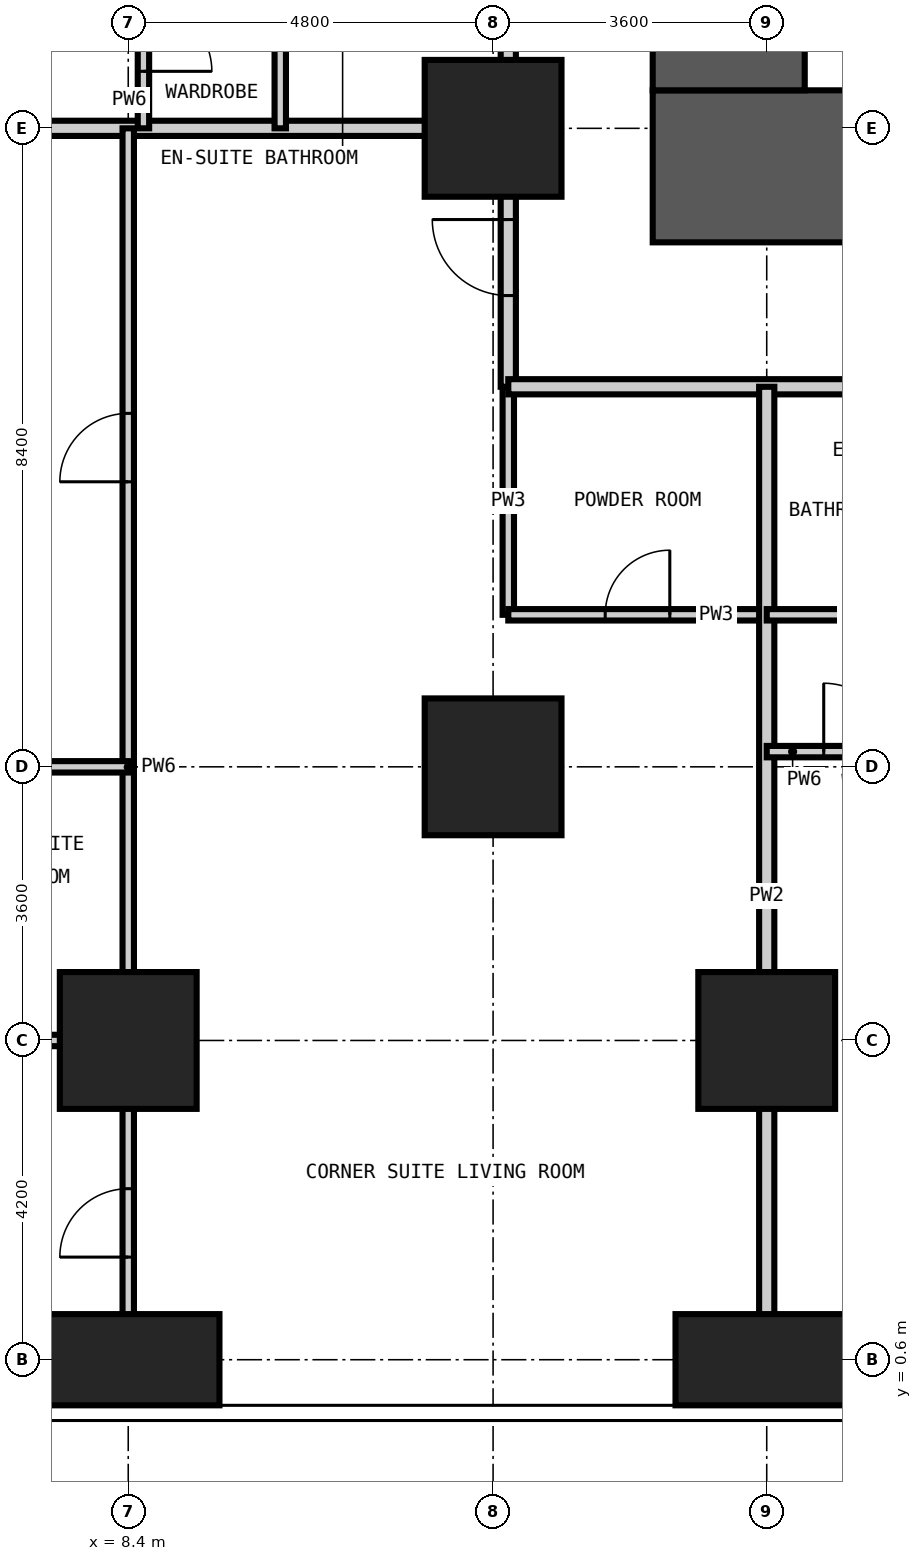
"""IFC4 building model, lengths in metres.
Left out: names, types, materials, properties, quantities, classifications, styles, units other than length and angle.
Written with IfcOpenShell. Run it as: python <this file> out.ifc"""

import sys

from ifc_helpers import new_model, si_unit, direction, frame, frame_2d, origin, origin_2d, place, context, subcontext, project, spatial, rectangle, extrude, element, fill, save


model = new_model("IFC4")
c1 = context("Model", 3, precision=1e-05, world=origin(), true_north=direction((0.0, 1.0)))
c2 = subcontext(c1, "Body", "Model", "MODEL_VIEW")
j1 = project(units=[si_unit("LENGTHUNIT", "METRE"), si_unit("PLANEANGLEUNIT", "RADIAN")], contexts=[c1])
p1 = place(None, origin())
s1 = spatial("IfcSite", under=j1, at=p1, CompositionType="ELEMENT")
p2 = place(p1, origin())
s2 = spatial("IfcBuilding", under=s1, at=p2, CompositionType="ELEMENT")
p3 = place(p2, frame((0.0, 0.0, 27.0)))
s3 = spatial("IfcBuildingStorey", under=s2, at=p3, CompositionType="ELEMENT", Elevation=27.0)
p4 = place(p3, frame((8.4, 0.6, -0.35), z_axis=(0.0, 0.0, 1.0), x_axis=(1.0, 0.0, 0.0)))
e1 = element("IfcColumn", 1, at=p4, inside=s3, PredefinedType="COLUMN", context=c2, shape_type="SweptSolid", body=[
    extrude(rectangle(XDim=2.4, YDim=1.2, at=origin_2d()), origin(), (0.0, 0.0, 1.0), 3.6),
])
for number, where, z_axis, x_axis in (
    (2, (8.4, 4.8, -0.35), (0.0, 0.0, 1.0), (1.0, 0.0, 0.0)),
    (3, (13.2, 8.4, -0.35), (0.0, 0.0, 1.0), (1.0, 0.0, 0.0)),
    (4, (13.2, 16.8, -0.35), (0.0, 0.0, 1.0), (1.0, 0.0, 0.0)),
):
    element("IfcColumn", number, at=place(p3, frame(where, z_axis=z_axis, x_axis=x_axis)), inside=s3, PredefinedType="COLUMN", context=c2, shape_type="SweptSolid", body=[
        extrude(rectangle(XDim=1.8, YDim=1.8, at=origin_2d()), origin(), (0.0, 0.0, 1.0), 3.6),
    ])
p5 = place(p3, frame((16.8, 0.6, -0.35), z_axis=(0.0, 0.0, 1.0), x_axis=(1.0, 0.0, 0.0)))
e5 = element("IfcColumn", 5, at=p5, inside=s3, PredefinedType="COLUMN", context=c2, shape_type="SweptSolid", body=[
    extrude(rectangle(XDim=2.4, YDim=1.2, at=origin_2d()), origin(), (0.0, 0.0, 1.0), 3.6),
])
p6 = place(p3, frame((16.8, 4.8, -0.35), z_axis=(0.0, 0.0, 1.0), x_axis=(1.0, 0.0, 0.0)))
e6 = element("IfcColumn", 6, at=p6, inside=s3, PredefinedType="COLUMN", context=c2, shape_type="SweptSolid", body=[
    extrude(rectangle(XDim=1.8, YDim=1.8, at=origin_2d()), origin(), (0.0, 0.0, 1.0), 3.6),
])
p7 = place(p3, frame((15.3, 16.3, -0.35), z_axis=(0.0, 0.0, 1.0), x_axis=(1.0, 0.0, 0.0)))
e7 = element("IfcWall", 7, at=p7, inside=s3, PredefinedType="SHEAR", context=c2, shape_type="SweptSolid", body=[
    extrude(rectangle(XDim=28.2, YDim=2.0, at=frame_2d((14.1, 0.0))), origin(), (0.0, 0.0, 1.0), 3.6),
])
p8 = place(p7, frame((13.6, 0.0, 0.35)))
e8 = element("IfcOpeningElement", 8, at=p8, cuts=e7, PredefinedType="OPENING", context=c2, shape_type="SweptSolid", body=[
    extrude(rectangle(XDim=1.0, YDim=2.1, at=frame_2d((0.5, 1.05))), frame((0.0, 1.01, 0.0), z_axis=(0.0, -1.0, 0.0), x_axis=(1.0, 0.0, 0.0)), (0.0, 0.0, 1.0), 2.02),
])
p9 = place(p7, frame((19.9, 0.0, 0.35)))
e9 = element("IfcOpeningElement", 9, at=p9, cuts=e7, PredefinedType="OPENING", context=c2, shape_type="SweptSolid", body=[
    extrude(rectangle(XDim=1.0, YDim=2.1, at=frame_2d((0.5, 1.05))), frame((0.0, 1.01, 0.0), z_axis=(0.0, -1.0, 0.0), x_axis=(1.0, 0.0, 0.0)), (0.0, 0.0, 1.0), 2.02),
])
p10 = place(p3, frame((16.3, 41.5, -0.35), z_axis=(0.0, 0.0, 1.0), x_axis=(0.0, -1.0, 0.0)))
e10 = element("IfcWall", 10, at=p10, inside=s3, PredefinedType="SHEAR", context=c2, shape_type="SweptSolid", body=[
    extrude(rectangle(XDim=24.2, YDim=2.0, at=frame_2d((12.1, 0.0))), origin(), (0.0, 0.0, 1.0), 3.6),
])
p11 = place(p10, frame((11.2, 0.0, 0.35)))
e11 = element("IfcOpeningElement", 11, at=p11, cuts=e10, PredefinedType="OPENING", context=c2, shape_type="SweptSolid", body=[
    extrude(rectangle(XDim=1.8, YDim=2.2, at=frame_2d((0.9, 1.1))), frame((0.0, 1.01, 0.0), z_axis=(0.0, -1.0, 0.0), x_axis=(1.0, 0.0, 0.0)), (0.0, 0.0, 1.0), 2.02),
])
p12 = place(p10, frame((20.0, 0.0, 0.35)))
e12 = element("IfcOpeningElement", 12, at=p12, cuts=e10, PredefinedType="OPENING", context=c2, shape_type="SweptSolid", body=[
    extrude(rectangle(XDim=1.0, YDim=2.1, at=frame_2d((0.5, 1.05))), frame((0.0, 1.01, 0.0), z_axis=(0.0, -1.0, 0.0), x_axis=(1.0, 0.0, 0.0)), (0.0, 0.0, 1.0), 2.02),
])
p13 = place(p10, frame((5.3, 0.0, 0.35)))
e13 = element("IfcOpeningElement", 13, at=p13, cuts=e10, PredefinedType="OPENING", context=c2, shape_type="SweptSolid", body=[
    extrude(rectangle(XDim=1.0, YDim=2.1, at=frame_2d((0.5, 1.05))), frame((0.0, 1.01, 0.0), z_axis=(0.0, -1.0, 0.0), x_axis=(1.0, 0.0, 0.0)), (0.0, 0.0, 1.0), 2.02),
])
for number, where, z_axis, x_axis in (
    (14, (13.4, 10.4, 0.0), (0.0, 0.0, 1.0), (0.0, 1.0, 0.0)),
    (15, (5.4, 4.8, 0.0), (0.0, 0.0, 1.0), (1.0, 0.0, 0.0)),
):
    element("IfcWall", number, at=place(p3, frame(where, z_axis=z_axis, x_axis=x_axis)), inside=s3, PredefinedType="PARTITIONING", context=c2, shape_type="SweptSolid", body=[
        extrude(rectangle(XDim=3.0, YDim=0.15, at=frame_2d((1.5, 0.0))), origin(), (0.0, 0.0, 1.0), 3.25),
    ])
p14 = place(p3, frame((13.4, 10.4, 0.0), z_axis=(0.0, 0.0, 1.0), x_axis=(1.0, 0.0, 0.0)))
e16 = element("IfcWall", 16, at=p14, inside=s3, PredefinedType="PARTITIONING", context=c2, shape_type="SweptSolid", body=[
    extrude(rectangle(XDim=3.4, YDim=0.15, at=frame_2d((1.7, 0.0))), origin(), (0.0, 0.0, 1.0), 3.25),
])
p15 = place(p14, frame((1.275, 0.0, 0.0)))
e17 = element("IfcOpeningElement", 17, at=p15, cuts=e16, PredefinedType="OPENING", context=c2, shape_type="SweptSolid", body=[
    extrude(rectangle(XDim=0.85, YDim=2.1, at=frame_2d((0.425, 1.05))), frame((0.0, 0.085, 0.0), z_axis=(0.0, -1.0, 0.0), x_axis=(1.0, 0.0, 0.0)), (0.0, 0.0, 1.0), 0.17),
])
p16 = place(p3, frame((13.4, 13.4, 0.0), z_axis=(0.0, 0.0, 1.0), x_axis=(0.0, 1.0, 0.0)))
e18 = element("IfcWall", 18, at=p16, inside=s3, PredefinedType="PARTITIONING", context=c2, shape_type="SweptSolid", body=[
    extrude(rectangle(XDim=20.2, YDim=0.2, at=frame_2d((10.1, 0.0))), origin(), (0.0, 0.0, 1.0), 3.25),
])
p17 = place(p16, frame((6.2, 0.0, 0.0)))
e19 = element("IfcOpeningElement", 19, at=p17, cuts=e18, PredefinedType="OPENING", context=c2, shape_type="SweptSolid", body=[
    extrude(rectangle(XDim=1.0, YDim=2.2, at=frame_2d((0.5, 1.1))), frame((0.0, 0.11, 0.0), z_axis=(0.0, -1.0, 0.0), x_axis=(1.0, 0.0, 0.0)), (0.0, 0.0, 1.0), 0.22),
])
p18 = place(p16, frame((8.0, 0.0, 0.0)))
e20 = element("IfcOpeningElement", 20, at=p18, cuts=e18, PredefinedType="OPENING", context=c2, shape_type="SweptSolid", body=[
    extrude(rectangle(XDim=1.0, YDim=2.2, at=frame_2d((0.5, 1.1))), frame((0.0, 0.11, 0.0), z_axis=(0.0, -1.0, 0.0), x_axis=(1.0, 0.0, 0.0)), (0.0, 0.0, 1.0), 0.22),
])
p19 = place(p16, frame((14.6, 0.0, 0.0)))
e21 = element("IfcOpeningElement", 21, at=p19, cuts=e18, PredefinedType="OPENING", context=c2, shape_type="SweptSolid", body=[
    extrude(rectangle(XDim=1.0, YDim=2.2, at=frame_2d((0.5, 1.1))), frame((0.0, 0.11, 0.0), z_axis=(0.0, -1.0, 0.0), x_axis=(1.0, 0.0, 0.0)), (0.0, 0.0, 1.0), 0.22),
])
p20 = place(p16, frame((16.4, 0.0, 0.0)))
e22 = element("IfcOpeningElement", 22, at=p20, cuts=e18, PredefinedType="OPENING", context=c2, shape_type="SweptSolid", body=[
    extrude(rectangle(XDim=1.0, YDim=2.2, at=frame_2d((0.5, 1.1))), frame((0.0, 0.11, 0.0), z_axis=(0.0, -1.0, 0.0), x_axis=(1.0, 0.0, 0.0)), (0.0, 0.0, 1.0), 0.22),
])
p21 = place(p16, frame((1.2, 0.0, 0.0)))
e23 = element("IfcOpeningElement", 23, at=p21, cuts=e18, PredefinedType="OPENING", context=c2, shape_type="SweptSolid", body=[
    extrude(rectangle(XDim=1.0, YDim=2.2, at=frame_2d((0.5, 1.1))), frame((0.0, 0.11, 0.0), z_axis=(0.0, -1.0, 0.0), x_axis=(1.0, 0.0, 0.0)), (0.0, 0.0, 1.0), 0.22),
])
p22 = place(p3, frame((45.7, 13.4, 0.0), z_axis=(0.0, 0.0, 1.0), x_axis=(-1.0, 0.0, 0.0)))
e24 = element("IfcWall", 24, at=p22, inside=s3, PredefinedType="PARTITIONING", context=c2, shape_type="SweptSolid", body=[
    extrude(rectangle(XDim=32.3, YDim=0.2, at=frame_2d((16.15, 0.0))), origin(), (0.0, 0.0, 1.0), 3.25),
])
p23 = place(p22, frame((25.1, 0.0, 0.0)))
e25 = element("IfcOpeningElement", 25, at=p23, cuts=e24, PredefinedType="OPENING", context=c2, shape_type="SweptSolid", body=[
    extrude(rectangle(XDim=1.0, YDim=2.2, at=frame_2d((0.5, 1.1))), frame((0.0, 0.11, 0.0), z_axis=(0.0, -1.0, 0.0), x_axis=(1.0, 0.0, 0.0)), (0.0, 0.0, 1.0), 0.22),
])
p24 = place(p22, frame((23.3, 0.0, 0.0)))
e26 = element("IfcOpeningElement", 26, at=p24, cuts=e24, PredefinedType="OPENING", context=c2, shape_type="SweptSolid", body=[
    extrude(rectangle(XDim=1.0, YDim=2.2, at=frame_2d((0.5, 1.1))), frame((0.0, 0.11, 0.0), z_axis=(0.0, -1.0, 0.0), x_axis=(1.0, 0.0, 0.0)), (0.0, 0.0, 1.0), 0.22),
])
p25 = place(p22, frame((16.7, 0.0, 0.0)))
e27 = element("IfcOpeningElement", 27, at=p25, cuts=e24, PredefinedType="OPENING", context=c2, shape_type="SweptSolid", body=[
    extrude(rectangle(XDim=1.0, YDim=2.2, at=frame_2d((0.5, 1.1))), frame((0.0, 0.11, 0.0), z_axis=(0.0, -1.0, 0.0), x_axis=(1.0, 0.0, 0.0)), (0.0, 0.0, 1.0), 0.22),
])
p26 = place(p22, frame((14.9, 0.0, 0.0)))
e28 = element("IfcOpeningElement", 28, at=p26, cuts=e24, PredefinedType="OPENING", context=c2, shape_type="SweptSolid", body=[
    extrude(rectangle(XDim=1.0, YDim=2.2, at=frame_2d((0.5, 1.1))), frame((0.0, 0.11, 0.0), z_axis=(0.0, -1.0, 0.0), x_axis=(1.0, 0.0, 0.0)), (0.0, 0.0, 1.0), 0.22),
])
p27 = place(p22, frame((8.3, 0.0, 0.0)))
e29 = element("IfcOpeningElement", 29, at=p27, cuts=e24, PredefinedType="OPENING", context=c2, shape_type="SweptSolid", body=[
    extrude(rectangle(XDim=1.0, YDim=2.2, at=frame_2d((0.5, 1.1))), frame((0.0, 0.11, 0.0), z_axis=(0.0, -1.0, 0.0), x_axis=(1.0, 0.0, 0.0)), (0.0, 0.0, 1.0), 0.22),
])
p28 = place(p22, frame((6.5, 0.0, 0.0)))
e30 = element("IfcOpeningElement", 30, at=p28, cuts=e24, PredefinedType="OPENING", context=c2, shape_type="SweptSolid", body=[
    extrude(rectangle(XDim=1.0, YDim=2.2, at=frame_2d((0.5, 1.1))), frame((0.0, 0.11, 0.0), z_axis=(0.0, -1.0, 0.0), x_axis=(1.0, 0.0, 0.0)), (0.0, 0.0, 1.0), 0.22),
])
for number, where, z_axis, x_axis in (
    (31, (16.8, -0.008, 0.0), (0.0, 0.0, 1.0), (0.0, 1.0, 0.0)),
    (32, (-0.008, 16.8, 0.0), (0.0, 0.0, 1.0), (1.0, 0.0, 0.0)),
):
    element("IfcWall", number, at=place(p3, frame(where, z_axis=z_axis, x_axis=x_axis)), inside=s3, PredefinedType="PARTITIONING", context=c2, shape_type="SweptSolid", body=[
        extrude(rectangle(XDim=13.408, YDim=0.2, at=frame_2d((6.704, 0.0))), origin(), (0.0, 0.0, 1.0), 3.25),
    ])
p29 = place(p3, frame((8.4, -0.008, 0.0), z_axis=(0.0, 0.0, 1.0), x_axis=(0.0, 1.0, 0.0)))
e33 = element("IfcWall", 33, at=p29, inside=s3, PredefinedType="PARTITIONING", context=c2, shape_type="SweptSolid", body=[
    extrude(rectangle(XDim=16.808, YDim=0.15, at=frame_2d((8.404, 0.0))), origin(), (0.0, 0.0, 1.0), 3.25),
])
p30 = place(p29, frame((1.958, 0.0, 0.0)))
e34 = element("IfcOpeningElement", 34, at=p30, cuts=e33, PredefinedType="OPENING", context=c2, shape_type="SweptSolid", body=[
    extrude(rectangle(XDim=0.9, YDim=2.1, at=frame_2d((0.45, 1.05))), frame((0.0, 0.085, 0.0), z_axis=(0.0, -1.0, 0.0), x_axis=(1.0, 0.0, 0.0)), (0.0, 0.0, 1.0), 0.17),
])
p31 = place(p29, frame((12.158, 0.0, 0.0)))
e35 = element("IfcOpeningElement", 35, at=p31, cuts=e33, PredefinedType="OPENING", context=c2, shape_type="SweptSolid", body=[
    extrude(rectangle(XDim=0.9, YDim=2.1, at=frame_2d((0.45, 1.05))), frame((0.0, 0.085, 0.0), z_axis=(0.0, -1.0, 0.0), x_axis=(1.0, 0.0, 0.0)), (0.0, 0.0, 1.0), 0.17),
])
p32 = place(p3, frame((8.6, 16.8, 0.0), z_axis=(0.0, 0.0, 1.0), x_axis=(0.0, 1.0, 0.0)))
e36 = element("IfcWall", 36, at=p32, inside=s3, PredefinedType="PARTITIONING", context=c2, shape_type="SweptSolid", body=[
    extrude(rectangle(XDim=2.4, YDim=0.15, at=frame_2d((1.2, 0.0))), origin(), (0.0, 0.0, 1.0), 3.25),
])
p33 = place(p32, frame((0.75, 0.0, 0.0)))
e37 = element("IfcOpeningElement", 37, at=p33, cuts=e36, PredefinedType="OPENING", context=c2, shape_type="SweptSolid", body=[
    extrude(rectangle(XDim=0.9, YDim=2.1, at=frame_2d((0.45, 1.05))), frame((0.0, 0.085, 0.0), z_axis=(0.0, -1.0, 0.0), x_axis=(1.0, 0.0, 0.0)), (0.0, 0.0, 1.0), 0.17),
])
p34 = place(p3, frame((10.4, 16.8, 0.0), z_axis=(0.0, 0.0, 1.0), x_axis=(0.0, 1.0, 0.0)))
e38 = element("IfcWall", 38, at=p34, inside=s3, PredefinedType="PARTITIONING", context=c2, shape_type="SweptSolid", body=[
    extrude(rectangle(XDim=2.4, YDim=0.15, at=frame_2d((1.2, 0.0))), origin(), (0.0, 0.0, 1.0), 3.25),
])
p35 = place(p3, frame((-0.008, 8.4, 0.0), z_axis=(0.0, 0.0, 1.0), x_axis=(1.0, 0.0, 0.0)))
e39 = element("IfcWall", 39, at=p35, inside=s3, PredefinedType="PARTITIONING", context=c2, shape_type="SweptSolid", body=[
    extrude(rectangle(XDim=8.408, YDim=0.15, at=frame_2d((4.204, 0.0))), origin(), (0.0, 0.0, 1.0), 3.25),
])
p36 = place(p35, frame((2.958, 0.0, 0.0)))
e40 = element("IfcOpeningElement", 40, at=p36, cuts=e39, PredefinedType="OPENING", context=c2, shape_type="SweptSolid", body=[
    extrude(rectangle(XDim=0.9, YDim=2.1, at=frame_2d((0.45, 1.05))), frame((0.0, 0.085, 0.0), z_axis=(0.0, -1.0, 0.0), x_axis=(1.0, 0.0, 0.0)), (0.0, 0.0, 1.0), 0.17),
])
p37 = place(p3, frame((16.8, 8.6, 0.0), z_axis=(0.0, 0.0, 1.0), x_axis=(1.0, 0.0, 0.0)))
e41 = element("IfcWall", 41, at=p37, inside=s3, PredefinedType="PARTITIONING", context=c2, shape_type="SweptSolid", body=[
    extrude(rectangle(XDim=2.4, YDim=0.15, at=frame_2d((1.2, 0.0))), origin(), (0.0, 0.0, 1.0), 3.25),
])
p38 = place(p37, frame((0.75, 0.0, 0.0)))
e42 = element("IfcOpeningElement", 42, at=p38, cuts=e41, PredefinedType="OPENING", context=c2, shape_type="SweptSolid", body=[
    extrude(rectangle(XDim=0.9, YDim=2.1, at=frame_2d((0.45, 1.05))), frame((0.0, 0.085, 0.0), z_axis=(0.0, -1.0, 0.0), x_axis=(1.0, 0.0, 0.0)), (0.0, 0.0, 1.0), 0.17),
])
p39 = place(p3, frame((16.8, 10.4, 0.0), z_axis=(0.0, 0.0, 1.0), x_axis=(1.0, 0.0, 0.0)))
e43 = element("IfcWall", 43, at=p39, inside=s3, PredefinedType="PARTITIONING", context=c2, shape_type="SweptSolid", body=[
    extrude(rectangle(XDim=2.4, YDim=0.15, at=frame_2d((1.2, 0.0))), origin(), (0.0, 0.0, 1.0), 3.25),
])
p40 = place(p38, origin())
e44 = element("IfcDoor", 44, at=p40, inside=s3, OperationType="SINGLE_SWING_LEFT", PredefinedType="DOOR", context=c2, shape_type="SweptSolid", body=[
    extrude(rectangle(XDim=0.9, YDim=2.1, at=frame_2d((0.45, 1.05))), frame((0.0, 0.025, 0.0), z_axis=(0.0, -1.0, 0.0), x_axis=(1.0, 0.0, 0.0)), (0.0, 0.0, 1.0), 0.05),
])
fill(e42, e44)
p41 = place(p33, frame((0.9, 0.0, 0.0), z_axis=(0.0, 0.0, 1.0), x_axis=(-1.0, 0.0, 0.0)))
e45 = element("IfcDoor", 45, at=p41, inside=s3, OperationType="SINGLE_SWING_RIGHT", PredefinedType="DOOR", context=c2, shape_type="SweptSolid", body=[
    extrude(rectangle(XDim=0.9, YDim=2.1, at=frame_2d((0.45, 1.05))), frame((0.0, 0.025, 0.0), z_axis=(0.0, -1.0, 0.0), x_axis=(1.0, 0.0, 0.0)), (0.0, 0.0, 1.0), 0.05),
])
fill(e37, e45)
p42 = place(p21, origin())
e46 = element("IfcDoor", 46, at=p42, inside=s3, OperationType="SINGLE_SWING_RIGHT", PredefinedType="DOOR", context=c2, shape_type="SweptSolid", body=[
    extrude(rectangle(XDim=1.0, YDim=2.2, at=frame_2d((0.5, 1.1))), frame((0.0, 0.025, 0.0), z_axis=(0.0, -1.0, 0.0), x_axis=(1.0, 0.0, 0.0)), (0.0, 0.0, 1.0), 0.05),
])
fill(e23, e46)
p43 = place(p15, origin())
e47 = element("IfcDoor", 47, at=p43, inside=s3, OperationType="SINGLE_SWING_RIGHT", PredefinedType="DOOR", context=c2, shape_type="SweptSolid", body=[
    extrude(rectangle(XDim=0.85, YDim=2.1, at=frame_2d((0.425, 1.05))), frame((0.0, 0.025, 0.0), z_axis=(0.0, -1.0, 0.0), x_axis=(1.0, 0.0, 0.0)), (0.0, 0.0, 1.0), 0.05),
])
fill(e17, e47)
p44 = place(p30, origin())
e48 = element("IfcDoor", 48, at=p44, inside=s3, OperationType="SINGLE_SWING_LEFT", PredefinedType="DOOR", context=c2, shape_type="SweptSolid", body=[
    extrude(rectangle(XDim=0.9, YDim=2.1, at=frame_2d((0.45, 1.05))), frame((0.0, 0.025, 0.0), z_axis=(0.0, -1.0, 0.0), x_axis=(1.0, 0.0, 0.0)), (0.0, 0.0, 1.0), 0.05),
])
fill(e34, e48)
p45 = place(p31, origin())
e49 = element("IfcDoor", 49, at=p45, inside=s3, OperationType="SINGLE_SWING_LEFT", PredefinedType="DOOR", context=c2, shape_type="SweptSolid", body=[
    extrude(rectangle(XDim=0.9, YDim=2.1, at=frame_2d((0.45, 1.05))), frame((0.0, 0.025, 0.0), z_axis=(0.0, -1.0, 0.0), x_axis=(1.0, 0.0, 0.0)), (0.0, 0.0, 1.0), 0.05),
])
fill(e35, e49)
save(model, sys.argv[1])
